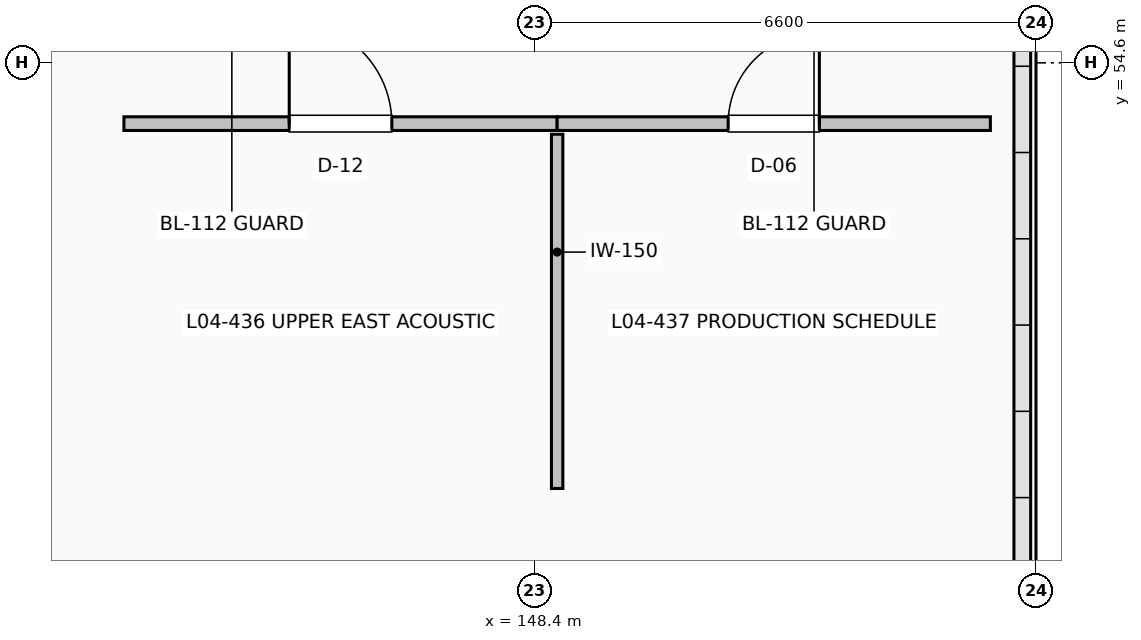
"""IFC4 building model, lengths in metres.
Left out: names, types, materials, properties, quantities, classifications, styles, units other than length and angle.
Written with IfcOpenShell. Run it as: python <this file> out.ifc"""

import sys

from ifc_helpers import new_model, si_unit, direction, frame, frame_2d, origin, place, context, subcontext, project, spatial, rectangle, extrude, element, fill, save


model = new_model("IFC4")
c1 = context("Model", 3, precision=1e-05, world=origin(), true_north=direction((0.0, 1.0)))
c2 = subcontext(c1, "Body", "Model", "MODEL_VIEW")
j1 = project(units=[si_unit("LENGTHUNIT", "METRE"), si_unit("PLANEANGLEUNIT", "RADIAN")], contexts=[c1])
p1 = place(None, origin())
s1 = spatial("IfcSite", under=j1, at=p1, CompositionType="ELEMENT")
p2 = place(p1, origin())
s2 = spatial("IfcBuilding", under=s1, at=p2, CompositionType="ELEMENT")
p3 = place(p2, frame((0.0, 0.0, 19.5)))
s3 = spatial("IfcBuildingStorey", under=s2, at=p3, CompositionType="ELEMENT", Elevation=19.5)
p4 = place(p3, frame((143.0, 53.8, 0.0), z_axis=(0.0, 0.0, 1.0), x_axis=(1.0, 0.0, 0.0)))
e1 = element("IfcWall", 1, at=p4, inside=s3, PredefinedType="PARTITIONING", context=c2, shape_type="SweptSolid", body=[
    extrude(rectangle(XDim=5.7, YDim=0.18, at=frame_2d((2.85, 0.0))), origin(), (0.0, 0.0, 1.0), 4.192),
])
p5 = place(p4, frame((2.175, 0.0, 0.0)))
e2 = element("IfcOpeningElement", 2, at=p5, cuts=e1, PredefinedType="OPENING", context=c2, shape_type="SweptSolid", body=[
    extrude(rectangle(XDim=1.35, YDim=2.16, at=frame_2d((0.675, 1.08))), frame((0.0, 0.1, 0.0), z_axis=(0.0, -1.0, 0.0), x_axis=(1.0, 0.0, 0.0)), (0.0, 0.0, 1.0), 0.2),
])
p6 = place(p3, frame((148.7, 49.0, 0.0), z_axis=(0.0, 0.0, 1.0), x_axis=(0.0, 1.0, 0.0)))
e3 = element("IfcWall", 3, at=p6, inside=s3, PredefinedType="PARTITIONING", context=c2, shape_type="SweptSolid", body=[
    extrude(rectangle(XDim=4.66, YDim=0.15, at=frame_2d((2.33, 0.0))), origin(), (0.0, 0.0, 1.0), 4.192),
])
p7 = place(p3, frame((148.7, 53.8, 0.0), z_axis=(0.0, 0.0, 1.0), x_axis=(1.0, 0.0, 0.0)))
e4 = element("IfcWall", 4, at=p7, inside=s3, PredefinedType="PARTITIONING", context=c2, shape_type="SweptSolid", body=[
    extrude(rectangle(XDim=5.7, YDim=0.18, at=frame_2d((2.85, 0.0))), origin(), (0.0, 0.0, 1.0), 4.192),
])
p8 = place(p7, frame((2.25, 0.0, 0.0)))
e5 = element("IfcOpeningElement", 5, at=p8, cuts=e4, PredefinedType="OPENING", context=c2, shape_type="SweptSolid", body=[
    extrude(rectangle(XDim=1.2, YDim=2.1, at=frame_2d((0.6, 1.05))), frame((0.0, 0.1, 0.0), z_axis=(0.0, -1.0, 0.0), x_axis=(1.0, 0.0, 0.0)), (0.0, 0.0, 1.0), 0.2),
])
p9 = place(p5, origin())
e6 = element("IfcDoor", 6, at=p9, inside=s3, OperationType="SINGLE_SWING_LEFT", PredefinedType="DOOR", context=c2, shape_type="SweptSolid", body=[
    extrude(rectangle(XDim=1.35, YDim=2.16, at=frame_2d((0.675, 1.08))), frame((0.0, 0.025, 0.0), z_axis=(0.0, -1.0, 0.0), x_axis=(1.0, 0.0, 0.0)), (0.0, 0.0, 1.0), 0.05),
])
fill(e2, e6)
p10 = place(p8, origin())
e7 = element("IfcDoor", 7, at=p10, inside=s3, OperationType="SINGLE_SWING_RIGHT", PredefinedType="DOOR", context=c2, shape_type="SweptSolid", body=[
    extrude(rectangle(XDim=1.2, YDim=2.1, at=frame_2d((0.6, 1.05))), frame((0.0, 0.025, 0.0), z_axis=(0.0, -1.0, 0.0), x_axis=(1.0, 0.0, 0.0)), (0.0, 0.0, 1.0), 0.05),
])
fill(e5, e7)
save(model, sys.argv[1])
